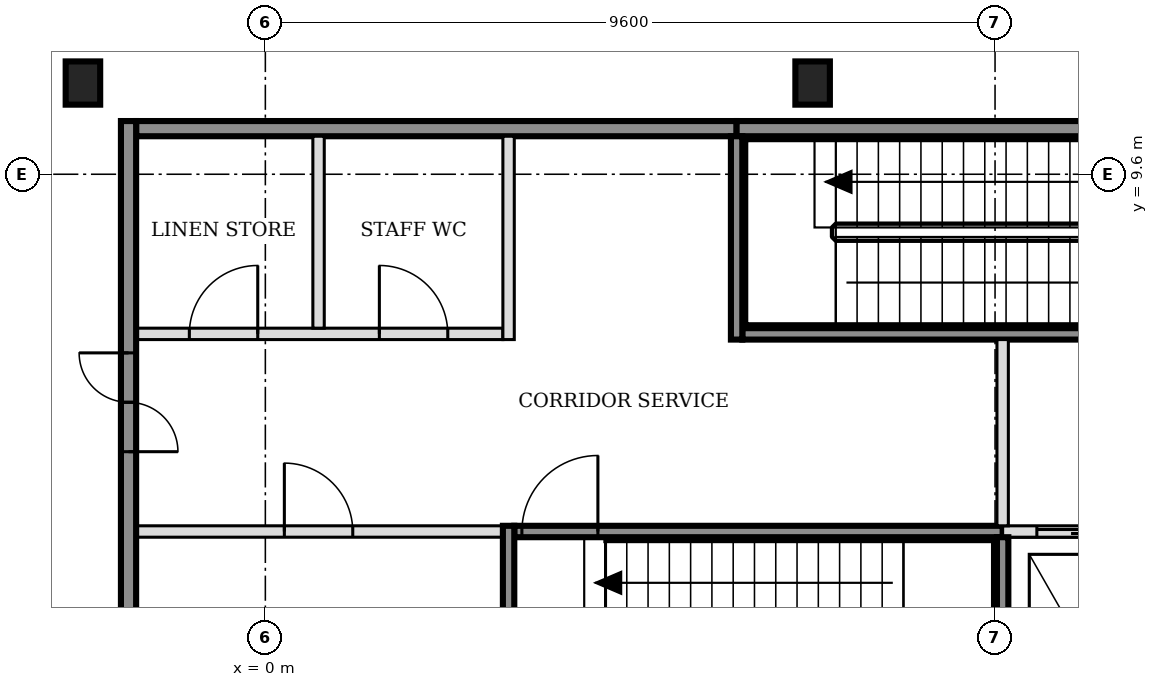
"""IFC4 building model, lengths in metres.
Left out: names, types, materials, properties, quantities, classifications, styles, units other than length and angle.
Written with IfcOpenShell. Run it as: python <this file> out.ifc"""

import sys

from ifc_helpers import new_model, si_unit, direction, frame, frame_2d, origin, origin_2d, place, context, subcontext, project, spatial, rectangle, i_section, extrude, element, fill, save


model = new_model("IFC4")
c1 = context("Model", 3, precision=1e-05, world=origin(), true_north=direction((0.0, 1.0)))
c2 = subcontext(c1, "Body", "Model", "MODEL_VIEW")
j1 = project(units=[si_unit("LENGTHUNIT", "METRE"), si_unit("PLANEANGLEUNIT", "RADIAN")], contexts=[c1])
p1 = place(None, origin())
s1 = spatial("IfcSite", under=j1, at=p1, CompositionType="ELEMENT")
p2 = place(p1, origin())
s2 = spatial("IfcBuilding", under=s1, at=p2, CompositionType="ELEMENT")
p3 = place(p2, frame((0.0, 0.0, 25.8)))
s3 = spatial("IfcBuildingStorey", under=s2, at=p3, CompositionType="ELEMENT", Elevation=25.8)
for number, where, z_axis, x_axis in (
    (1, (-2.4, 10.8, -0.2), (0.0, 0.0, 1.0), (1.0, 0.0, 0.0)),
    (2, (7.2, 10.8, -0.2), (0.0, 0.0, 1.0), (1.0, 0.0, 0.0)),
):
    element("IfcColumn", number, at=place(p3, frame(where, z_axis=z_axis, x_axis=x_axis)), inside=s3, PredefinedType="COLUMN", context=c2, shape_type="SweptSolid", body=[
        extrude(i_section(OverallWidth=0.454, OverallDepth=0.569, WebThickness=0.078, FlangeThickness=0.125, FilletRadius=0.015, at=origin_2d()), origin(), (0.0, 0.0, 1.0), 4.8),
    ])
p4 = place(p3, frame((-1.7, 4.9, 0.0), z_axis=(0.0, 0.0, 1.0), x_axis=(1.0, 0.0, 0.0)))
e3 = element("IfcWall", 3, at=p4, inside=s3, PredefinedType="PARTITIONING", context=c2, shape_type="SweptSolid", body=[
    extrude(rectangle(XDim=4.825, YDim=0.15, at=frame_2d((2.413, 0.0))), origin(), (0.0, 0.0, 1.0), 4.6),
])
p5 = place(p4, frame((1.95, 0.0, 0.0)))
e4 = element("IfcOpeningElement", 4, at=p5, cuts=e3, PredefinedType="OPENING", context=c2, shape_type="SweptSolid", body=[
    extrude(rectangle(XDim=0.9, YDim=2.1, at=frame_2d((0.45, 1.05))), frame((0.0, 0.085, 0.0), z_axis=(0.0, -1.0, 0.0), x_axis=(1.0, 0.0, 0.0)), (0.0, 0.0, 1.0), 0.17),
])
p6 = place(p3, frame((3.275, 4.9, 0.0), z_axis=(0.0, 0.0, 1.0), x_axis=(1.0, 0.0, 0.0)))
e5 = element("IfcWall", 5, at=p6, inside=s3, PredefinedType="SOLIDWALL", context=c2, shape_type="SweptSolid", body=[
    extrude(rectangle(XDim=6.425, YDim=0.15, at=frame_2d((3.212, 0.0))), origin(), (0.0, 0.0, 1.0), 4.6),
])
p7 = place(p6, frame((0.1, 0.0, 0.0)))
e6 = element("IfcOpeningElement", 6, at=p7, cuts=e5, PredefinedType="OPENING", context=c2, shape_type="SweptSolid", body=[
    extrude(rectangle(XDim=1.0, YDim=2.1, at=frame_2d((0.5, 1.05))), frame((0.0, 0.085, 0.0), z_axis=(0.0, -1.0, 0.0), x_axis=(1.0, 0.0, 0.0)), (0.0, 0.0, 1.0), 0.17),
])
p8 = place(p3, frame((9.7, 4.9, 0.0), z_axis=(0.0, 0.0, 1.0), x_axis=(1.0, 0.0, 0.0)))
e7 = element("IfcWall", 7, at=p8, inside=s3, PredefinedType="SOLIDWALL", context=c2, shape_type="SweptSolid", body=[
    extrude(rectangle(XDim=6.4, YDim=0.15, at=frame_2d((3.2, 0.0))), origin(), (0.0, 0.0, 1.0), 4.6),
])
p9 = place(p8, frame((0.45, 0.0, 0.0)))
e8 = element("IfcOpeningElement", 8, at=p9, cuts=e7, PredefinedType="OPENING", context=c2, shape_type="SweptSolid", body=[
    extrude(rectangle(XDim=1.0, YDim=2.1, at=frame_2d((0.5, 1.05))), frame((0.0, 0.085, 0.0), z_axis=(0.0, -1.0, 0.0), x_axis=(1.0, 0.0, 0.0)), (0.0, 0.0, 1.0), 0.17),
])
p10 = place(p8, frame((2.35, 0.0, 0.0)))
e9 = element("IfcOpeningElement", 9, at=p10, cuts=e7, PredefinedType="OPENING", context=c2, shape_type="SweptSolid", body=[
    extrude(rectangle(XDim=1.0, YDim=2.1, at=frame_2d((0.5, 1.05))), frame((0.0, 0.085, 0.0), z_axis=(0.0, -1.0, 0.0), x_axis=(1.0, 0.0, 0.0)), (0.0, 0.0, 1.0), 0.17),
])
p11 = place(p8, frame((4.7, 0.0, 0.0)))
e10 = element("IfcOpeningElement", 10, at=p11, cuts=e7, PredefinedType="OPENING", context=c2, shape_type="SweptSolid", body=[
    extrude(rectangle(XDim=0.9, YDim=2.1, at=frame_2d((0.45, 1.05))), frame((0.0, 0.085, 0.0), z_axis=(0.0, -1.0, 0.0), x_axis=(1.0, 0.0, 0.0)), (0.0, 0.0, 1.0), 0.17),
])
p12 = place(p3, frame((-1.7, 7.5, 0.0), z_axis=(0.0, 0.0, 1.0), x_axis=(1.0, 0.0, 0.0)))
e11 = element("IfcWall", 11, at=p12, inside=s3, PredefinedType="PARTITIONING", context=c2, shape_type="SweptSolid", body=[
    extrude(rectangle(XDim=4.825, YDim=0.15, at=frame_2d((2.413, 0.0))), origin(), (0.0, 0.0, 1.0), 4.6),
])
p13 = place(p12, frame((0.7, 0.0, 0.0)))
e12 = element("IfcOpeningElement", 12, at=p13, cuts=e11, PredefinedType="OPENING", context=c2, shape_type="SweptSolid", body=[
    extrude(rectangle(XDim=0.9, YDim=2.1, at=frame_2d((0.45, 1.05))), frame((0.0, 0.085, 0.0), z_axis=(0.0, -1.0, 0.0), x_axis=(1.0, 0.0, 0.0)), (0.0, 0.0, 1.0), 0.17),
])
p14 = place(p12, frame((3.2, 0.0, 0.0)))
e13 = element("IfcOpeningElement", 13, at=p14, cuts=e11, PredefinedType="OPENING", context=c2, shape_type="SweptSolid", body=[
    extrude(rectangle(XDim=0.9, YDim=2.1, at=frame_2d((0.45, 1.05))), frame((0.0, 0.085, 0.0), z_axis=(0.0, -1.0, 0.0), x_axis=(1.0, 0.0, 0.0)), (0.0, 0.0, 1.0), 0.17),
])
p15 = place(p3, frame((6.275, 7.5, 0.0), z_axis=(0.0, 0.0, 1.0), x_axis=(1.0, 0.0, 0.0)))
e14 = element("IfcWall", 14, at=p15, inside=s3, PredefinedType="SOLIDWALL", context=c2, shape_type="SweptSolid", body=[
    extrude(rectangle(XDim=6.425, YDim=0.15, at=frame_2d((3.212, 0.0))), origin(), (0.0, 0.0, 1.0), 4.6),
])
p16 = place(p15, frame((5.225, 0.0, 0.0)))
e15 = element("IfcOpeningElement", 15, at=p16, cuts=e14, PredefinedType="OPENING", context=c2, shape_type="SweptSolid", body=[
    extrude(rectangle(XDim=1.0, YDim=2.1, at=frame_2d((0.5, 1.05))), frame((0.0, 0.085, 0.0), z_axis=(0.0, -1.0, 0.0), x_axis=(1.0, 0.0, 0.0)), (0.0, 0.0, 1.0), 0.17),
])
p17 = place(p3, frame((-1.7, 10.2, 0.0), z_axis=(0.0, 0.0, 1.0), x_axis=(1.0, 0.0, 0.0)))
e16 = element("IfcWall", 16, at=p17, inside=s3, PredefinedType="SOLIDWALL", context=c2, shape_type="SweptSolid", body=[
    extrude(rectangle(XDim=7.9, YDim=0.2, at=frame_2d((3.95, 0.0))), origin(), (0.0, 0.0, 1.0), 4.6),
])
p18 = place(p3, frame((6.2, 10.2, 0.0), z_axis=(0.0, 0.0, 1.0), x_axis=(1.0, 0.0, 0.0)))
e17 = element("IfcWall", 17, at=p18, inside=s3, PredefinedType="SOLIDWALL", context=c2, shape_type="SweptSolid", body=[
    extrude(rectangle(XDim=6.5, YDim=0.2, at=frame_2d((3.25, 0.0))), origin(), (0.0, 0.0, 1.0), 4.6),
])
p19 = place(p3, frame((-1.8, -5.5, 0.0), z_axis=(0.0, 0.0, 1.0), x_axis=(0.0, 1.0, 0.0)))
e18 = element("IfcWall", 18, at=p19, inside=s3, PredefinedType="SOLIDWALL", context=c2, shape_type="SweptSolid", body=[
    extrude(rectangle(XDim=15.8, YDim=0.2, at=frame_2d((7.9, 0.0))), origin(), (0.0, 0.0, 1.0), 4.6),
])
p20 = place(p19, frame((3.05, 0.0, 0.0)))
e19 = element("IfcOpeningElement", 19, at=p20, cuts=e18, PredefinedType="OPENING", context=c2, shape_type="SweptSolid", body=[
    extrude(rectangle(XDim=1.3, YDim=2.1, at=frame_2d((0.65, 1.05))), frame((0.0, 0.11, 0.0), z_axis=(0.0, -1.0, 0.0), x_axis=(1.0, 0.0, 0.0)), (0.0, 0.0, 1.0), 0.22),
])
p21 = place(p19, frame((11.45, 0.0, 0.0)))
e20 = element("IfcOpeningElement", 20, at=p21, cuts=e18, PredefinedType="OPENING", context=c2, shape_type="SweptSolid", body=[
    extrude(rectangle(XDim=1.3, YDim=2.1, at=frame_2d((0.65, 1.05))), frame((0.0, 0.11, 0.0), z_axis=(0.0, -1.0, 0.0), x_axis=(1.0, 0.0, 0.0)), (0.0, 0.0, 1.0), 0.22),
])
p22 = place(p3, frame((0.7, 7.575, 0.0), z_axis=(0.0, 0.0, 1.0), x_axis=(0.0, 1.0, 0.0)))
e21 = element("IfcWall", 21, at=p22, inside=s3, PredefinedType="PARTITIONING", context=c2, shape_type="SweptSolid", body=[
    extrude(rectangle(XDim=2.525, YDim=0.15, at=frame_2d((1.263, 0.0))), origin(), (0.0, 0.0, 1.0), 4.6),
])
p23 = place(p3, frame((3.2, 2.275, 0.0), z_axis=(0.0, 0.0, 1.0), x_axis=(0.0, 1.0, 0.0)))
e22 = element("IfcWall", 22, at=p23, inside=s3, PredefinedType="SOLIDWALL", context=c2, shape_type="SweptSolid", body=[
    extrude(rectangle(XDim=2.7, YDim=0.15, at=frame_2d((1.35, 0.0))), origin(), (0.0, 0.0, 1.0), 4.6),
])
p24 = place(p3, frame((3.2, 7.425, 0.0), z_axis=(0.0, 0.0, 1.0), x_axis=(0.0, 1.0, 0.0)))
e23 = element("IfcWall", 23, at=p24, inside=s3, PredefinedType="PARTITIONING", context=c2, shape_type="SweptSolid", body=[
    extrude(rectangle(XDim=2.675, YDim=0.15, at=frame_2d((1.337, 0.0))), origin(), (0.0, 0.0, 1.0), 4.6),
])
p25 = place(p3, frame((6.2, 7.425, 0.0), z_axis=(0.0, 0.0, 1.0), x_axis=(0.0, 1.0, 0.0)))
e24 = element("IfcWall", 24, at=p25, inside=s3, PredefinedType="SOLIDWALL", context=c2, shape_type="SweptSolid", body=[
    extrude(rectangle(XDim=2.675, YDim=0.15, at=frame_2d((1.337, 0.0))), origin(), (0.0, 0.0, 1.0), 4.6),
])
p26 = place(p3, frame((9.7, 2.275, 0.0), z_axis=(0.0, 0.0, 1.0), x_axis=(0.0, 1.0, 0.0)))
e25 = element("IfcWall", 25, at=p26, inside=s3, PredefinedType="SOLIDWALL", context=c2, shape_type="SweptSolid", body=[
    extrude(rectangle(XDim=2.55, YDim=0.15, at=frame_2d((1.275, 0.0))), origin(), (0.0, 0.0, 1.0), 4.6),
])
p27 = place(p3, frame((9.7, 4.975, 0.0), z_axis=(0.0, 0.0, 1.0), x_axis=(0.0, 1.0, 0.0)))
e26 = element("IfcWall", 26, at=p27, inside=s3, PredefinedType="SOLIDWALL", context=c2, shape_type="SweptSolid", body=[
    extrude(rectangle(XDim=2.45, YDim=0.15, at=frame_2d((1.225, 0.0))), origin(), (0.0, 0.0, 1.0), 4.6),
])
p28 = place(p9, origin())
e27 = element("IfcDoor", 27, at=p28, inside=s3, OperationType="DOUBLE_DOOR_SLIDING", PredefinedType="DOOR", context=c2, shape_type="SweptSolid", body=[
    extrude(rectangle(XDim=1.0, YDim=2.1, at=frame_2d((0.5, 1.05))), frame((0.0, 0.025, 0.0), z_axis=(0.0, -1.0, 0.0), x_axis=(1.0, 0.0, 0.0)), (0.0, 0.0, 1.0), 0.05),
])
fill(e8, e27)
p29 = place(p7, origin())
e28 = element("IfcDoor", 28, at=p29, inside=s3, OperationType="SINGLE_SWING_RIGHT", PredefinedType="DOOR", context=c2, shape_type="SweptSolid", body=[
    extrude(rectangle(XDim=1.0, YDim=2.1, at=frame_2d((0.5, 1.05))), frame((0.0, 0.025, 0.0), z_axis=(0.0, -1.0, 0.0), x_axis=(1.0, 0.0, 0.0)), (0.0, 0.0, 1.0), 0.05),
])
fill(e6, e28)
p30 = place(p21, origin())
e29 = element("IfcDoor", 29, at=p30, inside=s3, OperationType="DOUBLE_DOOR_SINGLE_SWING", PredefinedType="DOOR", context=c2, shape_type="SweptSolid", body=[
    extrude(rectangle(XDim=1.3, YDim=2.1, at=frame_2d((0.65, 1.05))), frame((0.0, 0.025, 0.0), z_axis=(0.0, -1.0, 0.0), x_axis=(1.0, 0.0, 0.0)), (0.0, 0.0, 1.0), 0.05),
])
fill(e20, e29)
p31 = place(p5, origin())
e30 = element("IfcDoor", 30, at=p31, inside=s3, OperationType="SINGLE_SWING_LEFT", PredefinedType="DOOR", context=c2, shape_type="SweptSolid", body=[
    extrude(rectangle(XDim=0.9, YDim=2.1, at=frame_2d((0.45, 1.05))), frame((0.0, 0.025, 0.0), z_axis=(0.0, -1.0, 0.0), x_axis=(1.0, 0.0, 0.0)), (0.0, 0.0, 1.0), 0.05),
])
fill(e4, e30)
p32 = place(p13, origin())
e31 = element("IfcDoor", 31, at=p32, inside=s3, OperationType="SINGLE_SWING_RIGHT", PredefinedType="DOOR", context=c2, shape_type="SweptSolid", body=[
    extrude(rectangle(XDim=0.9, YDim=2.1, at=frame_2d((0.45, 1.05))), frame((0.0, 0.025, 0.0), z_axis=(0.0, -1.0, 0.0), x_axis=(1.0, 0.0, 0.0)), (0.0, 0.0, 1.0), 0.05),
])
fill(e12, e31)
p33 = place(p14, origin())
e32 = element("IfcDoor", 32, at=p33, inside=s3, OperationType="SINGLE_SWING_LEFT", PredefinedType="DOOR", context=c2, shape_type="SweptSolid", body=[
    extrude(rectangle(XDim=0.9, YDim=2.1, at=frame_2d((0.45, 1.05))), frame((0.0, 0.025, 0.0), z_axis=(0.0, -1.0, 0.0), x_axis=(1.0, 0.0, 0.0)), (0.0, 0.0, 1.0), 0.05),
])
fill(e13, e32)
save(model, sys.argv[1])
